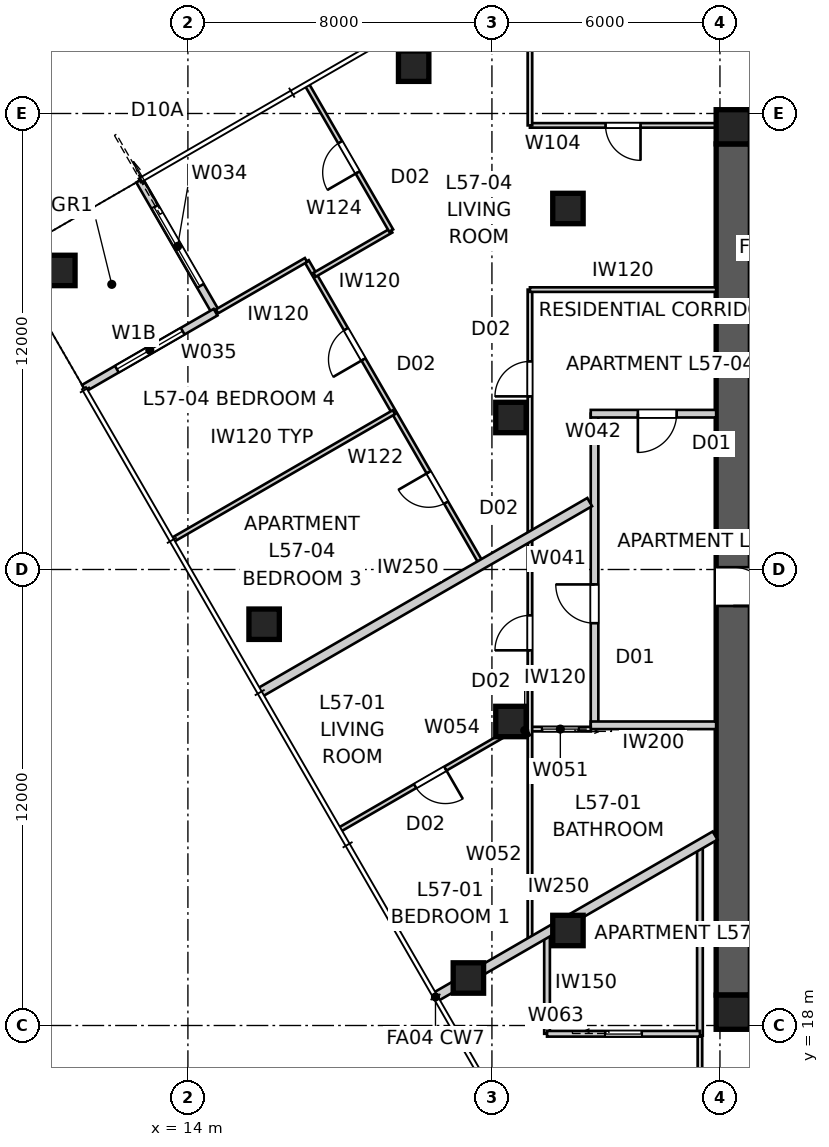
"""IFC4 building model, lengths in metres.
Left out: names, types, materials, properties, quantities, classifications, styles, units other than length and angle.
Written with IfcOpenShell. Run it as: python <this file> out.ifc"""

import sys

from ifc_helpers import new_model, si_unit, direction, frame, frame_2d, origin, origin_2d, place, context, subcontext, project, spatial, polyline, rectangle, outline, extrude, element, fill, save


model = new_model("IFC4")
c1 = context("Model", 3, precision=1e-05, world=origin(), true_north=direction((0.0, 1.0)))
c2 = subcontext(c1, "Body", "Model", "MODEL_VIEW")
j1 = project(units=[si_unit("LENGTHUNIT", "METRE"), si_unit("PLANEANGLEUNIT", "RADIAN")], contexts=[c1])
p1 = place(None, origin())
s1 = spatial("IfcSite", under=j1, at=p1, CompositionType="ELEMENT")
p2 = place(p1, origin())
s2 = spatial("IfcBuilding", under=s1, at=p2, CompositionType="ELEMENT")
p3 = place(p2, frame((0.0, 0.0, 208.2)))
s3 = spatial("IfcBuildingStorey", under=s2, at=p3, CompositionType="ELEMENT", Elevation=208.2)
for number, where, z_axis, x_axis in (
    (1, (28.8, 41.65, 0.0), (0.0, 0.0, 1.0), (1.0, 0.0, 0.0)),
    (2, (51.2, 18.35, 0.0), (0.0, 0.0, 1.0), (-1.0, 0.0, 0.0)),
):
    element("IfcWall", number, at=place(p3, frame(where, z_axis=z_axis, x_axis=x_axis)), inside=s3, PredefinedType="SHEAR", context=c2, shape_type="SweptSolid", body=[
        extrude(outline(polyline([(0.0, -0.45), (22.4, -0.45), (22.4, -0.025), (22.85, -0.025), (22.85, 0.025), (22.4, 0.025), (22.4, 0.45), (0.0, 0.45), (0.0, 0.025), (-0.45, 0.025), (-0.45, -0.025), (0.0, -0.025), (0.0, -0.45)])), origin(), (0.0, 0.0, 1.0), 3.4),
    ])
p4 = place(p3, frame((28.35, 41.2, 0.0), z_axis=(0.0, 0.0, 1.0), x_axis=(0.0, -1.0, 0.0)))
e3 = element("IfcWall", 3, at=p4, inside=s3, PredefinedType="SHEAR", context=c2, shape_type="SweptSolid", body=[
    extrude(outline(polyline([(0.0, -0.45), (22.4, -0.45), (22.4, -0.025), (22.85, -0.025), (22.85, 0.025), (22.4, 0.025), (22.4, 0.45), (0.0, 0.45), (0.0, 0.025), (-0.45, 0.025), (-0.45, -0.025), (0.0, -0.025), (0.0, -0.45)])), origin(), (0.0, 0.0, 1.0), 3.4),
])
p5 = place(p4, frame((11.14, 0.0, 0.0)))
e4 = element("IfcOpeningElement", 4, at=p5, cuts=e3, PredefinedType="OPENING", context=c2, shape_type="SweptSolid", body=[
    extrude(rectangle(XDim=1.02, YDim=2.4, at=frame_2d((0.51, 1.2))), frame((0.0, 0.46, 0.0), z_axis=(0.0, -1.0, 0.0), x_axis=(1.0, 0.0, 0.0)), (0.0, 0.0, 1.0), 0.92),
])
for number, where, z_axis, x_axis in (
    (5, (28.35, 18.35, 0.0), (0.0, 0.0, 1.0), (1.0, 0.0, 0.0)),
    (6, (28.35, 41.65, 0.0), (0.0, 0.0, 1.0), (1.0, 0.0, 0.0)),
):
    element("IfcColumn", number, at=place(p3, frame(where, z_axis=z_axis, x_axis=x_axis)), inside=s3, PredefinedType="COLUMN", context=c2, shape_type="SweptSolid", body=[
        extrude(rectangle(XDim=0.9, YDim=0.9, at=origin_2d()), origin(), (0.0, 0.0, 1.0), 3.4),
    ])
for number, where, z_axis, x_axis in (
    (7, (19.94, 43.245, -0.15), (0.0, 0.0, 1.0), (1.0, 0.0, 0.0)),
    (8, (10.63, 37.87, -0.15), (0.0, 0.0, 1.0), (1.0, 0.0, 0.0)),
    (9, (16.005, 28.56, -0.15), (0.0, 0.0, 1.0), (1.0, 0.0, 0.0)),
    (10, (21.38, 19.25, -0.15), (0.0, 0.0, 1.0), (1.0, 0.0, 0.0)),
):
    element("IfcColumn", number, at=place(p3, frame(where, z_axis=z_axis, x_axis=x_axis)), inside=s3, PredefinedType="COLUMN", context=c2, shape_type="SweptSolid", body=[
        extrude(rectangle(XDim=0.8, YDim=0.8, at=origin_2d()), origin(), (0.0, 0.0, 1.0), 3.55),
    ])
for number, where, z_axis, x_axis in (
    (11, (24.0, 39.5, 0.0), (0.0, 0.0, 1.0), (1.0, 0.0, 0.0)),
    (12, (22.5, 34.0, 0.0), (0.0, 0.0, 1.0), (1.0, 0.0, 0.0)),
    (13, (22.5, 26.0, 0.0), (0.0, 0.0, 1.0), (1.0, 0.0, 0.0)),
    (14, (24.0, 20.5, 0.0), (0.0, 0.0, 1.0), (1.0, 0.0, 0.0)),
):
    element("IfcColumn", number, at=place(p3, frame(where, z_axis=z_axis, x_axis=x_axis)), inside=s3, PredefinedType="COLUMN", context=c2, shape_type="SweptSolid", body=[
        extrude(rectangle(XDim=0.8, YDim=0.8, at=origin_2d()), origin(), (0.0, 0.0, 1.0), 3.4),
    ])
p6 = place(p3, frame((12.729, 40.236, 0.0), z_axis=(0.0, 0.0, 1.0), x_axis=(0.49999894854, -0.866026010844, 0.0)))
e15 = element("IfcWall", 15, at=p6, inside=s3, PredefinedType="SOLIDWALL", context=c2, shape_type="SweptSolid", body=[
    extrude(rectangle(XDim=4.0, YDim=0.2, at=frame_2d((2.0, 0.0))), origin(), (0.0, 0.0, 1.0), 3.25),
])
p7 = place(p6, frame((0.8, 0.0, 0.0)))
e16 = element("IfcOpeningElement", 16, at=p7, cuts=e15, PredefinedType="OPENING", context=c2, shape_type="SweptSolid", body=[
    extrude(rectangle(XDim=2.4, YDim=2.1, at=frame_2d((1.2, 1.05))), frame((0.0, 0.11, 0.0), z_axis=(0.0, -1.0, 0.0), x_axis=(1.0, 0.0, 0.0)), (0.0, 0.0, 1.0), 0.22),
])
p8 = place(p3, frame((14.729, 36.771, 0.0), z_axis=(0.0, 0.0, 1.0), x_axis=(-0.866026010844, -0.49999894854, 0.0)))
e17 = element("IfcWall", 17, at=p8, inside=s3, PredefinedType="SOLIDWALL", context=c2, shape_type="SweptSolid", body=[
    extrude(rectangle(XDim=4.0, YDim=0.2, at=frame_2d((2.0, 0.0))), origin(), (0.0, 0.0, 1.0), 3.25),
])
p9 = place(p8, frame((1.0, 0.0, 0.45)))
e18 = element("IfcOpeningElement", 18, at=p9, cuts=e17, PredefinedType="OPENING", context=c2, shape_type="SweptSolid", body=[
    extrude(rectangle(XDim=2.0, YDim=1.8, at=frame_2d((1.0, 0.9))), frame((0.0, 0.11, 0.0), z_axis=(0.0, -1.0, 0.0), x_axis=(1.0, 0.0, 0.0)), (0.0, 0.0, 1.0), 0.22),
])
p10 = place(p3, frame((24.7, 25.9, 0.0), z_axis=(0.0, 0.0, 1.0), x_axis=(0.0, 1.0, 0.0)))
e19 = element("IfcWall", 19, at=p10, inside=s3, PredefinedType="PARTITIONING", context=c2, shape_type="SweptSolid", body=[
    extrude(rectangle(XDim=8.2, YDim=0.2, at=frame_2d((4.1, 0.0))), origin(), (0.0, 0.0, 1.0), 3.25),
])
p11 = place(p10, frame((2.687, 0.0, 0.0)))
e20 = element("IfcOpeningElement", 20, at=p11, cuts=e19, PredefinedType="OPENING", context=c2, shape_type="SweptSolid", body=[
    extrude(rectangle(XDim=1.02, YDim=2.34, at=frame_2d((0.51, 1.17))), frame((0.0, 0.11, 0.0), z_axis=(0.0, -1.0, 0.0), x_axis=(1.0, 0.0, 0.0)), (0.0, 0.0, 1.0), 0.22),
])
p12 = place(p3, frame((27.9, 34.1, 0.0), z_axis=(0.0, 0.0, 1.0), x_axis=(-1.0, 0.0, 0.0)))
e21 = element("IfcWall", 21, at=p12, inside=s3, PredefinedType="PARTITIONING", context=c2, shape_type="SweptSolid", body=[
    extrude(rectangle(XDim=3.3, YDim=0.2, at=frame_2d((1.65, 0.0))), origin(), (0.0, 0.0, 1.0), 3.25),
])
p13 = place(p12, frame((1.04, 0.0, 0.0)))
e22 = element("IfcOpeningElement", 22, at=p13, cuts=e21, PredefinedType="OPENING", context=c2, shape_type="SweptSolid", body=[
    extrude(rectangle(XDim=1.02, YDim=2.34, at=frame_2d((0.51, 1.17))), frame((0.0, 0.11, 0.0), z_axis=(0.0, -1.0, 0.0), x_axis=(1.0, 0.0, 0.0)), (0.0, 0.0, 1.0), 0.22),
])
p14 = place(p3, frame((27.9, 25.9, 0.0), z_axis=(0.0, 0.0, 1.0), x_axis=(-1.0, 0.0, 0.0)))
e23 = element("IfcWall", 23, at=p14, inside=s3, PredefinedType="PARTITIONING", context=c2, shape_type="SweptSolid", body=[
    extrude(rectangle(XDim=3.3, YDim=0.2, at=frame_2d((1.65, 0.0))), origin(), (0.0, 0.0, 1.0), 3.25),
])
p15 = place(p3, frame((20.514, 18.75, 0.0), z_axis=(0.0, 0.0, 1.0), x_axis=(0.866020489494, 0.500008511703, 0.0)))
e24 = element("IfcWall", 24, at=p15, inside=s3, PredefinedType="PARTITIONING", context=c2, shape_type="SweptSolid", body=[
    extrude(rectangle(XDim=8.496, YDim=0.25, at=frame_2d((4.248, 0.0))), origin(), (0.0, 0.0, 1.0), 3.25),
])
p16 = place(p3, frame((15.889, 26.761, 0.0), z_axis=(0.0, 0.0, 1.0), x_axis=(0.866024190901, 0.50000210077, 0.0)))
e25 = element("IfcWall", 25, at=p16, inside=s3, PredefinedType="PARTITIONING", context=c2, shape_type="SweptSolid", body=[
    extrude(rectangle(XDim=10.026, YDim=0.25, at=frame_2d((5.013, 0.0))), origin(), (0.0, 0.0, 1.0), 3.25),
])
p17 = place(p3, frame((24.6, 25.8, 0.0), z_axis=(0.0, 0.0, 1.0), x_axis=(-1.0, 0.0, 0.0)))
e26 = element("IfcWall", 26, at=p17, inside=s3, PredefinedType="PARTITIONING", context=c2, shape_type="SweptSolid", body=[
    extrude(rectangle(XDim=1.6, YDim=0.12, at=frame_2d((0.8, 0.0))), origin(), (0.0, 0.0, 1.0), 3.25),
])
p18 = place(p17, frame((0.32, 0.0, 0.0)))
e27 = element("IfcOpeningElement", 27, at=p18, cuts=e26, PredefinedType="OPENING", context=c2, shape_type="SweptSolid", body=[
    extrude(rectangle(XDim=0.96, YDim=2.1, at=frame_2d((0.48, 1.05))), frame((0.0, 0.07, 0.0), z_axis=(0.0, -1.0, 0.0), x_axis=(1.0, 0.0, 0.0)), (0.0, 0.0, 1.0), 0.14),
])
p19 = place(p3, frame((23.0, 20.185, 0.0), z_axis=(0.0, 0.0, 1.0), x_axis=(0.0, 1.0, 0.0)))
e28 = element("IfcWall", 28, at=p19, inside=s3, PredefinedType="PARTITIONING", context=c2, shape_type="SweptSolid", body=[
    extrude(rectangle(XDim=17.18, YDim=0.12, at=frame_2d((8.59, 0.0))), origin(), (0.0, 0.0, 1.0), 2.55),
])
p20 = place(p19, frame((7.688, 0.0, 0.0)))
e29 = element("IfcOpeningElement", 29, at=p20, cuts=e28, PredefinedType="OPENING", context=c2, shape_type="SweptSolid", body=[
    extrude(rectangle(XDim=0.92, YDim=2.34, at=frame_2d((0.46, 1.17))), frame((0.0, 0.07, 0.0), z_axis=(0.0, -1.0, 0.0), x_axis=(1.0, 0.0, 0.0)), (0.0, 0.0, 1.0), 0.14),
])
p21 = place(p19, frame((14.371, 0.0, 0.0)))
e30 = element("IfcOpeningElement", 30, at=p21, cuts=e28, PredefinedType="OPENING", context=c2, shape_type="SweptSolid", body=[
    extrude(rectangle(XDim=0.92, YDim=2.34, at=frame_2d((0.46, 1.17))), frame((0.0, 0.07, 0.0), z_axis=(0.0, -1.0, 0.0), x_axis=(1.0, 0.0, 0.0)), (0.0, 0.0, 1.0), 0.14),
])
p22 = place(p3, frame((22.95, 25.612, 0.0), z_axis=(0.0, 0.0, 1.0), x_axis=(-0.49996389635, 0.866046247233, 0.0)))
e31 = element("IfcWall", 31, at=p22, inside=s3, PredefinedType="PARTITIONING", context=c2, shape_type="SweptSolid", body=[
    extrude(rectangle(XDim=0.35, YDim=0.12, at=frame_2d((0.175, 0.0))), origin(), (0.0, 0.0, 1.0), 3.25),
])
p23 = place(p3, frame((22.775, 25.915, 0.0), z_axis=(0.0, 0.0, 1.0), x_axis=(-0.866019274569, -0.500010615962, 0.0)))
e32 = element("IfcWall", 32, at=p23, inside=s3, PredefinedType="PARTITIONING", context=c2, shape_type="SweptSolid", body=[
    extrude(rectangle(XDim=5.5, YDim=0.12, at=frame_2d((2.75, 0.0))), origin(), (0.0, 0.0, 1.0), 3.25),
])
p24 = place(p23, frame((2.31, 0.0, 0.0)))
e33 = element("IfcOpeningElement", 33, at=p24, cuts=e32, PredefinedType="OPENING", context=c2, shape_type="SweptSolid", body=[
    extrude(rectangle(XDim=0.92, YDim=2.34, at=frame_2d((0.46, 1.17))), frame((0.0, 0.07, 0.0), z_axis=(0.0, -1.0, 0.0), x_axis=(1.0, 0.0, 0.0)), (0.0, 0.0, 1.0), 0.14),
])
p25 = place(p3, frame((27.473, 13.0, 0.0), z_axis=(0.0, 0.0, 1.0), x_axis=(0.0, 1.0, 0.0)))
e34 = element("IfcWall", 34, at=p25, inside=s3, PredefinedType="PARTITIONING", context=c2, shape_type="SweptSolid", body=[
    extrude(rectangle(XDim=4.732, YDim=0.12, at=frame_2d((2.366, 0.0))), origin(), (0.0, 0.0, 1.0), 3.25),
])
p26 = place(p25, frame((0.922, 0.0, 0.0)))
e35 = element("IfcOpeningElement", 35, at=p26, cuts=e34, PredefinedType="OPENING", context=c2, shape_type="SweptSolid", body=[
    extrude(rectangle(XDim=0.96, YDim=2.1, at=frame_2d((0.48, 1.05))), frame((0.0, 0.07, 0.0), z_axis=(0.0, -1.0, 0.0), x_axis=(1.0, 0.0, 0.0)), (0.0, 0.0, 1.0), 0.14),
])
p27 = place(p3, frame((27.473, 17.732, 0.0), z_axis=(0.0, 0.0, 1.0), x_axis=(0.0, 1.0, 0.0)))
e36 = element("IfcWall", 36, at=p27, inside=s3, PredefinedType="SOLIDWALL", context=c2, shape_type="SweptSolid", body=[
    extrude(rectangle(XDim=5.035, YDim=0.15, at=frame_2d((2.518, 0.0))), origin(), (0.0, 0.0, 1.0), 3.25),
])
p28 = place(p3, frame((23.45, 20.445, 0.0), z_axis=(0.0, 0.0, 1.0), x_axis=(0.0, -1.0, 0.0)))
e37 = element("IfcWall", 37, at=p28, inside=s3, PredefinedType="SOLIDWALL", context=c2, shape_type="SweptSolid", body=[
    extrude(rectangle(XDim=2.663, YDim=0.15, at=frame_2d((1.331, 0.0))), origin(), (0.0, 0.0, 1.0), 3.25),
])
p29 = place(p3, frame((23.45, 17.782, 0.0), z_axis=(0.0, 0.0, 1.0), x_axis=(1.0, 0.0, 0.0)))
e38 = element("IfcWall", 38, at=p29, inside=s3, PredefinedType="SOLIDWALL", context=c2, shape_type="SweptSolid", body=[
    extrude(rectangle(XDim=4.023, YDim=0.15, at=frame_2d((2.012, 0.0))), origin(), (0.0, 0.0, 1.0), 3.25),
])
p30 = place(p29, frame((1.532, 0.0, 0.0)))
e39 = element("IfcOpeningElement", 39, at=p30, cuts=e38, PredefinedType="OPENING", context=c2, shape_type="SweptSolid", body=[
    extrude(rectangle(XDim=0.96, YDim=2.1, at=frame_2d((0.48, 1.05))), frame((0.0, 0.085, 0.0), z_axis=(0.0, -1.0, 0.0), x_axis=(1.0, 0.0, 0.0)), (0.0, 0.0, 1.0), 0.17),
])
p31 = place(p3, frame((23.0, 37.365, 0.0), z_axis=(0.0, 0.0, 1.0), x_axis=(1.0, 0.0, 0.0)))
e40 = element("IfcWall", 40, at=p31, inside=s3, PredefinedType="PARTITIONING", context=c2, shape_type="SweptSolid", body=[
    extrude(rectangle(XDim=4.9, YDim=0.12, at=frame_2d((2.45, 0.0))), origin(), (0.0, 0.0, 1.0), 3.25),
])
p32 = place(p3, frame((27.9, 41.687, 0.0), z_axis=(0.0, 0.0, 1.0), x_axis=(-1.0, 0.0, 0.0)))
e41 = element("IfcWall", 41, at=p32, inside=s3, PredefinedType="PARTITIONING", context=c2, shape_type="SweptSolid", body=[
    extrude(rectangle(XDim=4.9, YDim=0.12, at=frame_2d((2.45, 0.0))), origin(), (0.0, 0.0, 1.0), 3.25),
])
p33 = place(p32, frame((1.99, 0.0, 0.0)))
e42 = element("IfcOpeningElement", 42, at=p33, cuts=e41, PredefinedType="OPENING", context=c2, shape_type="SweptSolid", body=[
    extrude(rectangle(XDim=0.92, YDim=2.1, at=frame_2d((0.46, 1.05))), frame((0.0, 0.07, 0.0), z_axis=(0.0, -1.0, 0.0), x_axis=(1.0, 0.0, 0.0)), (0.0, 0.0, 1.0), 0.14),
])
p34 = place(p3, frame((23.0, 41.687, 0.0), z_axis=(0.0, 0.0, 1.0), x_axis=(0.0, 1.0, 0.0)))
e43 = element("IfcWall", 43, at=p34, inside=s3, PredefinedType="PARTITIONING", context=c2, shape_type="SweptSolid", body=[
    extrude(rectangle(XDim=4.433, YDim=0.12, at=frame_2d((2.216, 0.0))), origin(), (0.0, 0.0, 1.0), 3.25),
])
p35 = place(p3, frame((21.733, 30.134, 0.0), z_axis=(0.0, 0.0, 1.0), x_axis=(-0.500019218905, 0.86601430746, 0.0)))
e44 = element("IfcWall", 44, at=p35, inside=s3, PredefinedType="PARTITIONING", context=c2, shape_type="SweptSolid", body=[
    extrude(rectangle(XDim=9.21, YDim=0.12, at=frame_2d((4.605, 0.0))), origin(), (0.0, 0.0, 1.0), 3.25),
])
p36 = place(p35, frame((1.877, 0.0, 0.0)))
e45 = element("IfcOpeningElement", 45, at=p36, cuts=e44, PredefinedType="OPENING", context=c2, shape_type="SweptSolid", body=[
    extrude(rectangle(XDim=0.92, YDim=2.34, at=frame_2d((0.46, 1.17))), frame((0.0, 0.07, 0.0), z_axis=(0.0, -1.0, 0.0), x_axis=(1.0, 0.0, 0.0)), (0.0, 0.0, 1.0), 0.14),
])
p37 = place(p35, frame((6.228, 0.0, 0.0)))
e46 = element("IfcOpeningElement", 46, at=p37, cuts=e44, PredefinedType="OPENING", context=c2, shape_type="SweptSolid", body=[
    extrude(rectangle(XDim=0.92, YDim=2.34, at=frame_2d((0.46, 1.17))), frame((0.0, 0.07, 0.0), z_axis=(0.0, -1.0, 0.0), x_axis=(1.0, 0.0, 0.0)), (0.0, 0.0, 1.0), 0.14),
])
p38 = place(p3, frame((17.333, 37.755, 0.0), z_axis=(0.0, 0.0, 1.0), x_axis=(0.866059848015, 0.499940336097, 0.0)))
e47 = element("IfcWall", 47, at=p38, inside=s3, PredefinedType="PARTITIONING", context=c2, shape_type="SweptSolid", body=[
    extrude(rectangle(XDim=2.328, YDim=0.12, at=frame_2d((1.164, 0.0))), origin(), (0.0, 0.0, 1.0), 3.25),
])
p39 = place(p3, frame((19.349, 38.919, 0.0), z_axis=(0.0, 0.0, 1.0), x_axis=(-0.499997192861, 0.866027024481, 0.0)))
e48 = element("IfcWall", 48, at=p39, inside=s3, PredefinedType="PARTITIONING", context=c2, shape_type="SweptSolid", body=[
    extrude(rectangle(XDim=4.41, YDim=0.12, at=frame_2d((2.205, 0.0))), origin(), (0.0, 0.0, 1.0), 3.25),
])
p40 = place(p39, frame((1.765, 0.0, 0.0)))
e49 = element("IfcOpeningElement", 49, at=p40, cuts=e48, PredefinedType="OPENING", context=c2, shape_type="SweptSolid", body=[
    extrude(rectangle(XDim=0.92, YDim=2.34, at=frame_2d((0.46, 1.17))), frame((0.0, 0.07, 0.0), z_axis=(0.0, -1.0, 0.0), x_axis=(1.0, 0.0, 0.0)), (0.0, 0.0, 1.0), 0.14),
])
p41 = place(p3, frame((13.612, 30.786, 0.0), z_axis=(0.0, 0.0, 1.0), x_axis=(0.866030409726, 0.499991329354, 0.0)))
e50 = element("IfcWall", 50, at=p41, inside=s3, PredefinedType="PARTITIONING", context=c2, shape_type="SweptSolid", body=[
    extrude(rectangle(XDim=6.707, YDim=0.12, at=frame_2d((3.354, 0.0))), origin(), (0.0, 0.0, 1.0), 3.25),
])
p42 = place(p3, frame((14.763, 36.792, 0.0), z_axis=(0.0, 0.0, 1.0), x_axis=(0.86601436245, 0.500019123664, 0.0)))
e51 = element("IfcWall", 51, at=p42, inside=s3, PredefinedType="PARTITIONING", context=c2, shape_type="SweptSolid", body=[
    extrude(rectangle(XDim=2.707, YDim=0.12, at=frame_2d((1.354, 0.0))), origin(), (0.0, 0.0, 1.0), 3.25),
])
p43 = place(p3, frame((27.9, 41.687, 0.0), z_axis=(0.0, 0.0, 1.0), x_axis=(0.999162409553, -0.040920402453, 0.0)))
e52 = element("IfcWall", 52, at=p43, inside=s3, PredefinedType="PARTITIONING", context=c2, shape_type="SweptSolid", body=[
    extrude(rectangle(XDim=0.901, YDim=0.12, at=frame_2d((0.45, 0.0))), origin(), (0.0, 0.0, 1.0), 3.25),
])
p44 = place(p7, origin())
e53 = element("IfcDoor", 53, at=p44, inside=s3, OperationType="SLIDING_TO_LEFT", PredefinedType="DOOR", context=c2, shape_type="SweptSolid", body=[
    extrude(rectangle(XDim=2.4, YDim=2.1, at=frame_2d((1.2, 1.05))), frame((0.0, 0.025, 0.0), z_axis=(0.0, -1.0, 0.0), x_axis=(1.0, 0.0, 0.0)), (0.0, 0.0, 1.0), 0.05),
])
fill(e16, e53)
p45 = place(p9, origin())
e54 = element("IfcWindow", 54, at=p45, inside=s3, PartitioningType="SINGLE_PANEL", PredefinedType="WINDOW", context=c2, shape_type="SweptSolid", body=[
    extrude(rectangle(XDim=2.0, YDim=1.8, at=frame_2d((1.0, 0.9))), frame((0.0, 0.03, 0.0), z_axis=(0.0, -1.0, 0.0), x_axis=(1.0, 0.0, 0.0)), (0.0, 0.0, 1.0), 0.06),
])
fill(e18, e54)
p46 = place(p11, origin())
e55 = element("IfcDoor", 55, at=p46, inside=s3, OperationType="SINGLE_SWING_RIGHT", PredefinedType="DOOR", context=c2, shape_type="SweptSolid", body=[
    extrude(rectangle(XDim=1.02, YDim=2.34, at=frame_2d((0.51, 1.17))), frame((0.0, 0.025, 0.0), z_axis=(0.0, -1.0, 0.0), x_axis=(1.0, 0.0, 0.0)), (0.0, 0.0, 1.0), 0.05),
])
fill(e20, e55)
p47 = place(p13, origin())
e56 = element("IfcDoor", 56, at=p47, inside=s3, OperationType="SINGLE_SWING_RIGHT", PredefinedType="DOOR", context=c2, shape_type="SweptSolid", body=[
    extrude(rectangle(XDim=1.02, YDim=2.34, at=frame_2d((0.51, 1.17))), frame((0.0, 0.025, 0.0), z_axis=(0.0, -1.0, 0.0), x_axis=(1.0, 0.0, 0.0)), (0.0, 0.0, 1.0), 0.05),
])
fill(e22, e56)
p48 = place(p20, origin())
e57 = element("IfcDoor", 57, at=p48, inside=s3, OperationType="SINGLE_SWING_LEFT", PredefinedType="DOOR", context=c2, shape_type="SweptSolid", body=[
    extrude(rectangle(XDim=0.92, YDim=2.34, at=frame_2d((0.46, 1.17))), frame((0.0, 0.025, 0.0), z_axis=(0.0, -1.0, 0.0), x_axis=(1.0, 0.0, 0.0)), (0.0, 0.0, 1.0), 0.05),
])
fill(e29, e57)
p49 = place(p18, origin())
e58 = element("IfcDoor", 58, at=p49, inside=s3, OperationType="SLIDING_TO_LEFT", PredefinedType="DOOR", context=c2, shape_type="SweptSolid", body=[
    extrude(rectangle(XDim=0.96, YDim=2.1, at=frame_2d((0.48, 1.05))), frame((0.0, 0.025, 0.0), z_axis=(0.0, -1.0, 0.0), x_axis=(1.0, 0.0, 0.0)), (0.0, 0.0, 1.0), 0.05),
])
fill(e27, e58)
p50 = place(p21, origin())
e59 = element("IfcDoor", 59, at=p50, inside=s3, OperationType="SINGLE_SWING_LEFT", PredefinedType="DOOR", context=c2, shape_type="SweptSolid", body=[
    extrude(rectangle(XDim=0.92, YDim=2.34, at=frame_2d((0.46, 1.17))), frame((0.0, 0.025, 0.0), z_axis=(0.0, -1.0, 0.0), x_axis=(1.0, 0.0, 0.0)), (0.0, 0.0, 1.0), 0.05),
])
fill(e30, e59)
p51 = place(p24, origin())
e60 = element("IfcDoor", 60, at=p51, inside=s3, OperationType="SINGLE_SWING_LEFT", PredefinedType="DOOR", context=c2, shape_type="SweptSolid", body=[
    extrude(rectangle(XDim=0.92, YDim=2.34, at=frame_2d((0.46, 1.17))), frame((0.0, 0.025, 0.0), z_axis=(0.0, -1.0, 0.0), x_axis=(1.0, 0.0, 0.0)), (0.0, 0.0, 1.0), 0.05),
])
fill(e33, e60)
p52 = place(p33, origin())
e61 = element("IfcDoor", 61, at=p52, inside=s3, OperationType="SINGLE_SWING_LEFT", PredefinedType="DOOR", context=c2, shape_type="SweptSolid", body=[
    extrude(rectangle(XDim=0.92, YDim=2.1, at=frame_2d((0.46, 1.05))), frame((0.0, 0.025, 0.0), z_axis=(0.0, -1.0, 0.0), x_axis=(1.0, 0.0, 0.0)), (0.0, 0.0, 1.0), 0.05),
])
fill(e42, e61)
p53 = place(p36, origin())
e62 = element("IfcDoor", 62, at=p53, inside=s3, OperationType="SINGLE_SWING_RIGHT", PredefinedType="DOOR", context=c2, shape_type="SweptSolid", body=[
    extrude(rectangle(XDim=0.92, YDim=2.34, at=frame_2d((0.46, 1.17))), frame((0.0, 0.025, 0.0), z_axis=(0.0, -1.0, 0.0), x_axis=(1.0, 0.0, 0.0)), (0.0, 0.0, 1.0), 0.05),
])
fill(e45, e62)
p54 = place(p40, origin())
e63 = element("IfcDoor", 63, at=p54, inside=s3, OperationType="SINGLE_SWING_LEFT", PredefinedType="DOOR", context=c2, shape_type="SweptSolid", body=[
    extrude(rectangle(XDim=0.92, YDim=2.34, at=frame_2d((0.46, 1.17))), frame((0.0, 0.025, 0.0), z_axis=(0.0, -1.0, 0.0), x_axis=(1.0, 0.0, 0.0)), (0.0, 0.0, 1.0), 0.05),
])
fill(e49, e63)
p55 = place(p37, origin())
e64 = element("IfcDoor", 64, at=p55, inside=s3, OperationType="SINGLE_SWING_LEFT", PredefinedType="DOOR", context=c2, shape_type="SweptSolid", body=[
    extrude(rectangle(XDim=0.92, YDim=2.34, at=frame_2d((0.46, 1.17))), frame((0.0, 0.025, 0.0), z_axis=(0.0, -1.0, 0.0), x_axis=(1.0, 0.0, 0.0)), (0.0, 0.0, 1.0), 0.05),
])
fill(e46, e64)
p56 = place(p30, origin())
e65 = element("IfcDoor", 65, at=p56, inside=s3, OperationType="SLIDING_TO_LEFT", PredefinedType="DOOR", context=c2, shape_type="SweptSolid", body=[
    extrude(rectangle(XDim=0.96, YDim=2.1, at=frame_2d((0.48, 1.05))), frame((0.0, 0.025, 0.0), z_axis=(0.0, -1.0, 0.0), x_axis=(1.0, 0.0, 0.0)), (0.0, 0.0, 1.0), 0.05),
])
fill(e39, e65)
p57 = place(p5, origin())
e66 = element("IfcDoor", 66, at=p57, inside=s3, OperationType="SINGLE_SWING_RIGHT", PredefinedType="DOOR", context=c2, shape_type="SweptSolid", body=[
    extrude(rectangle(XDim=1.02, YDim=2.4, at=frame_2d((0.51, 1.2))), frame((0.0, 0.025, 0.0), z_axis=(0.0, -1.0, 0.0), x_axis=(1.0, 0.0, 0.0)), (0.0, 0.0, 1.0), 0.05),
])
fill(e4, e66)
save(model, sys.argv[1])
